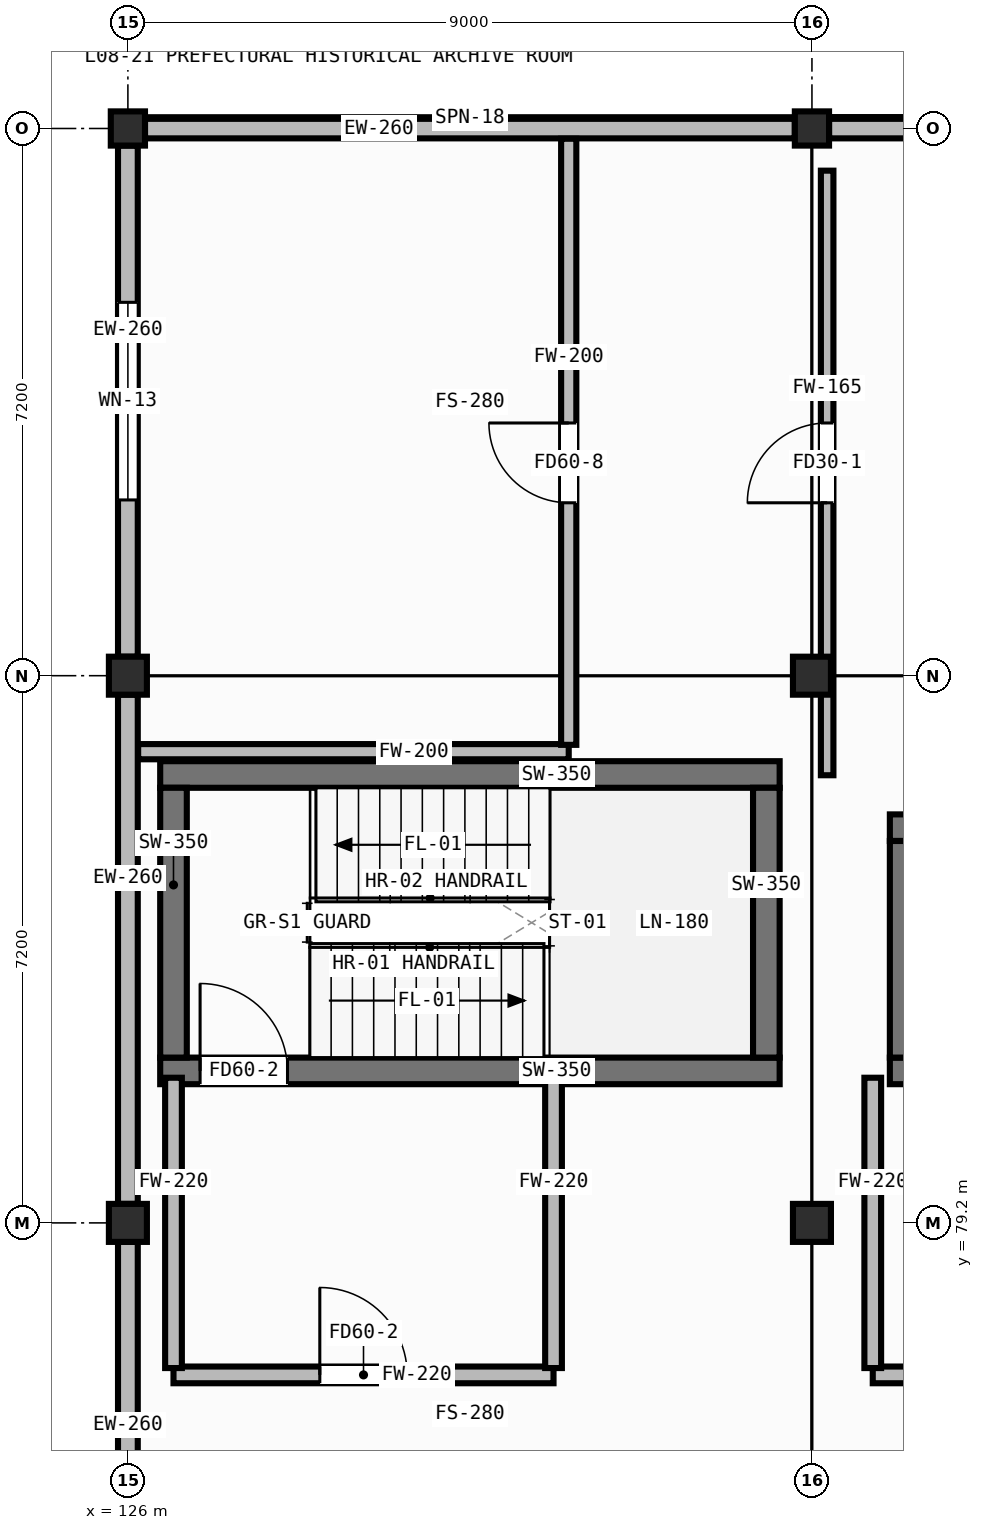
"""IFC4 building model, lengths in metres.
Left out: names, types, materials, properties, quantities, classifications, styles, units other than length and angle.
Written with IfcOpenShell. Run it as: python <this file> out.ifc"""

import sys

from ifc_helpers import new_model, si_unit, direction, frame, frame_2d, origin, origin_2d, place, context, subcontext, project, spatial, rectangle, hollow_rectangle, extrude, element, fill, save


model = new_model("IFC4")
c1 = context("Model", 3, precision=1e-05, world=origin(), true_north=direction((0.0, 1.0)))
c2 = subcontext(c1, "Body", "Model", "MODEL_VIEW")
j1 = project(units=[si_unit("LENGTHUNIT", "METRE"), si_unit("PLANEANGLEUNIT", "RADIAN")], contexts=[c1])
p1 = place(None, origin())
s1 = spatial("IfcSite", under=j1, at=p1, CompositionType="ELEMENT")
p2 = place(p1, origin())
s2 = spatial("IfcBuilding", under=s1, at=p2, CompositionType="ELEMENT")
p3 = place(p2, frame((0.0, 0.0, 27.8)))
s3 = spatial("IfcBuildingStorey", under=s2, at=p3, CompositionType="ELEMENT", Elevation=27.8)
for number, where, z_axis, x_axis in (
    (1, (126.0, 79.2, 0.0), (0.0, 0.0, 1.0), (1.0, 0.0, 0.0)),
    (2, (126.0, 86.4, 0.0), (0.0, 0.0, 1.0), (1.0, 0.0, 0.0)),
):
    element("IfcColumn", number, at=place(p3, frame(where, z_axis=z_axis, x_axis=x_axis)), inside=s3, PredefinedType="COLUMN", context=c2, shape_type="SweptSolid", body=[
        extrude(hollow_rectangle(XDim=0.5, YDim=0.5, WallThickness=0.022, at=origin_2d()), origin(), (0.0, 0.0, 1.0), 3.6),
    ])
p4 = place(p3, frame((126.0, 93.6, 0.0), z_axis=(0.0, 0.0, 1.0), x_axis=(1.0, 0.0, 0.0)))
e3 = element("IfcColumn", 3, at=p4, inside=s3, PredefinedType="COLUMN", context=c2, shape_type="SweptSolid", body=[
    extrude(hollow_rectangle(XDim=0.45, YDim=0.45, WallThickness=0.019, at=origin_2d()), origin(), (0.0, 0.0, 1.0), 3.6),
])
for number, where, z_axis, x_axis in (
    (4, (135.0, 79.2, 0.0), (0.0, 0.0, 1.0), (1.0, 0.0, 0.0)),
    (5, (135.0, 86.4, 0.0), (0.0, 0.0, 1.0), (1.0, 0.0, 0.0)),
):
    element("IfcColumn", number, at=place(p3, frame(where, z_axis=z_axis, x_axis=x_axis)), inside=s3, PredefinedType="COLUMN", context=c2, shape_type="SweptSolid", body=[
        extrude(hollow_rectangle(XDim=0.5, YDim=0.5, WallThickness=0.022, at=origin_2d()), origin(), (0.0, 0.0, 1.0), 3.6),
    ])
p5 = place(p3, frame((135.0, 93.6, 0.0), z_axis=(0.0, 0.0, 1.0), x_axis=(1.0, 0.0, 0.0)))
e6 = element("IfcColumn", 6, at=p5, inside=s3, PredefinedType="COLUMN", context=c2, shape_type="SweptSolid", body=[
    extrude(hollow_rectangle(XDim=0.45, YDim=0.45, WallThickness=0.019, at=origin_2d()), origin(), (0.0, 0.0, 1.0), 3.6),
])
p6 = place(p3, frame((134.775, 93.6, 0.0), z_axis=(0.0, 0.0, 1.0), x_axis=(-1.0, 0.0, 0.0)))
e7 = element("IfcWall", 7, at=p6, inside=s3, PredefinedType="STANDARD", context=c2, shape_type="SweptSolid", body=[
    extrude(rectangle(XDim=8.55, YDim=0.26, at=frame_2d((4.275, 0.0))), origin(), (0.0, 0.0, 1.0), 2.915),
])
p7 = place(p3, frame((143.775, 93.6, 0.0), z_axis=(0.0, 0.0, 1.0), x_axis=(-1.0, 0.0, 0.0)))
e8 = element("IfcWall", 8, at=p7, inside=s3, PredefinedType="STANDARD", context=c2, shape_type="SweptSolid", body=[
    extrude(rectangle(XDim=8.55, YDim=0.26, at=frame_2d((4.275, 0.0))), origin(), (0.0, 0.0, 1.0), 2.915),
])
p8 = place(p7, frame((2.975, 0.0, 0.85)))
e9 = element("IfcOpeningElement", 9, at=p8, cuts=e8, PredefinedType="OPENING", context=c2, shape_type="SweptSolid", body=[
    extrude(rectangle(XDim=2.6, YDim=1.6, at=frame_2d((1.3, 0.8))), frame((0.0, 0.142, 0.0), z_axis=(0.0, -1.0, 0.0), x_axis=(1.0, 0.0, 0.0)), (0.0, 0.0, 1.0), 0.284),
])
for number, where, z_axis, x_axis in (
    (10, (126.0, 72.25, 0.0), (0.0, 0.0, 1.0), (0.0, 1.0, 0.0)),
    (11, (126.0, 79.45, 0.0), (0.0, 0.0, 1.0), (0.0, 1.0, 0.0)),
):
    element("IfcWall", number, at=place(p3, frame(where, z_axis=z_axis, x_axis=x_axis)), inside=s3, PredefinedType="STANDARD", context=c2, shape_type="SweptSolid", body=[
        extrude(rectangle(XDim=6.7, YDim=0.26, at=frame_2d((3.35, 0.0))), origin(), (0.0, 0.0, 1.0), 2.915),
    ])
p9 = place(p3, frame((126.0, 86.65, 0.0), z_axis=(0.0, 0.0, 1.0), x_axis=(0.0, 1.0, 0.0)))
e12 = element("IfcWall", 12, at=p9, inside=s3, PredefinedType="STANDARD", context=c2, shape_type="SweptSolid", body=[
    extrude(rectangle(XDim=6.725, YDim=0.26, at=frame_2d((3.363, 0.0))), origin(), (0.0, 0.0, 1.0), 2.915),
])
p10 = place(p9, frame((2.062, 0.0, 0.85)))
e13 = element("IfcOpeningElement", 13, at=p10, cuts=e12, PredefinedType="OPENING", context=c2, shape_type="SweptSolid", body=[
    extrude(rectangle(XDim=2.6, YDim=1.6, at=frame_2d((1.3, 0.8))), frame((0.0, 0.142, 0.0), z_axis=(0.0, -1.0, 0.0), x_axis=(1.0, 0.0, 0.0)), (0.0, 0.0, 1.0), 0.284),
])
p11 = place(p3, frame((126.425, 81.2, 0.0), z_axis=(0.0, 0.0, 1.0), x_axis=(1.0, 0.0, 0.0)))
e14 = element("IfcWall", 14, at=p11, inside=s3, PredefinedType="SHEAR", context=c2, shape_type="SweptSolid", body=[
    extrude(rectangle(XDim=8.15, YDim=0.35, at=frame_2d((4.075, 0.0))), origin(), (0.0, 0.0, 1.0), 3.315),
])
p12 = place(p11, frame((0.525, 0.0, 0.0)))
e15 = element("IfcOpeningElement", 15, at=p12, cuts=e14, PredefinedType="OPENING", context=c2, shape_type="SweptSolid", body=[
    extrude(rectangle(XDim=1.15, YDim=2.1, at=frame_2d((0.575, 1.05))), frame((0.0, 0.187, 0.0), z_axis=(0.0, -1.0, 0.0), x_axis=(1.0, 0.0, 0.0)), (0.0, 0.0, 1.0), 0.374),
])
p13 = place(p3, frame((126.425, 85.1, 0.0), z_axis=(0.0, 0.0, 1.0), x_axis=(1.0, 0.0, 0.0)))
e16 = element("IfcWall", 16, at=p13, inside=s3, PredefinedType="SHEAR", context=c2, shape_type="SweptSolid", body=[
    extrude(rectangle(XDim=8.15, YDim=0.35, at=frame_2d((4.075, 0.0))), origin(), (0.0, 0.0, 1.0), 3.315),
])
for number, where, z_axis, x_axis in (
    (17, (126.6, 81.375, 0.0), (0.0, 0.0, 1.0), (0.0, 1.0, 0.0)),
    (18, (134.4, 81.375, 0.0), (0.0, 0.0, 1.0), (0.0, 1.0, 0.0)),
):
    element("IfcWall", number, at=place(p3, frame(where, z_axis=z_axis, x_axis=x_axis)), inside=s3, PredefinedType="SHEAR", context=c2, shape_type="SweptSolid", body=[
        extrude(rectangle(XDim=3.55, YDim=0.35, at=frame_2d((1.775, 0.0))), origin(), (0.0, 0.0, 1.0), 3.315),
    ])
p14 = place(p3, frame((136.025, 81.2, 0.0), z_axis=(0.0, 0.0, 1.0), x_axis=(1.0, 0.0, 0.0)))
e19 = element("IfcWall", 19, at=p14, inside=s3, PredefinedType="SHEAR", context=c2, shape_type="SweptSolid", body=[
    extrude(rectangle(XDim=2.75, YDim=0.35, at=frame_2d((1.375, 0.0))), origin(), (0.0, 0.0, 1.0), 3.315),
])
p15 = place(p14, frame((0.8, 0.0, 0.0)))
e20 = element("IfcOpeningElement", 20, at=p15, cuts=e19, PredefinedType="OPENING", context=c2, shape_type="SweptSolid", body=[
    extrude(rectangle(XDim=1.15, YDim=2.12, at=frame_2d((0.575, 1.06))), frame((0.0, 0.187, 0.0), z_axis=(0.0, -1.0, 0.0), x_axis=(1.0, 0.0, 0.0)), (0.0, 0.0, 1.0), 0.374),
])
p16 = place(p3, frame((136.025, 84.4, 0.0), z_axis=(0.0, 0.0, 1.0), x_axis=(1.0, 0.0, 0.0)))
e21 = element("IfcWall", 21, at=p16, inside=s3, PredefinedType="SHEAR", context=c2, shape_type="SweptSolid", body=[
    extrude(rectangle(XDim=2.75, YDim=0.35, at=frame_2d((1.375, 0.0))), origin(), (0.0, 0.0, 1.0), 3.315),
])
p17 = place(p3, frame((136.2, 81.375, 0.0), z_axis=(0.0, 0.0, 1.0), x_axis=(0.0, 1.0, 0.0)))
e22 = element("IfcWall", 22, at=p17, inside=s3, PredefinedType="SHEAR", context=c2, shape_type="SweptSolid", body=[
    extrude(rectangle(XDim=2.85, YDim=0.35, at=frame_2d((1.425, 0.0))), origin(), (0.0, 0.0, 1.0), 3.315),
])
p18 = place(p3, frame((126.6, 77.2, 0.0), z_axis=(0.0, 0.0, 1.0), x_axis=(1.0, 0.0, 0.0)))
e23 = element("IfcWall", 23, at=p18, inside=s3, PredefinedType="PARTITIONING", context=c2, shape_type="SweptSolid", body=[
    extrude(rectangle(XDim=5.0, YDim=0.22, at=frame_2d((2.5, 0.0))), origin(), (0.0, 0.0, 1.0), 3.315),
])
p19 = place(p18, frame((1.925, 0.0, 0.0)))
e24 = element("IfcOpeningElement", 24, at=p19, cuts=e23, PredefinedType="OPENING", context=c2, shape_type="SweptSolid", body=[
    extrude(rectangle(XDim=1.15, YDim=2.1, at=frame_2d((0.575, 1.05))), frame((0.0, 0.122, 0.0), z_axis=(0.0, -1.0, 0.0), x_axis=(1.0, 0.0, 0.0)), (0.0, 0.0, 1.0), 0.244),
])
for number, where, z_axis, x_axis in (
    (25, (126.6, 77.29, 0.0), (0.0, 0.0, 1.0), (0.0, 1.0, 0.0)),
    (26, (131.6, 77.29, 0.0), (0.0, 0.0, 1.0), (0.0, 1.0, 0.0)),
):
    element("IfcWall", number, at=place(p3, frame(where, z_axis=z_axis, x_axis=x_axis)), inside=s3, PredefinedType="PARTITIONING", context=c2, shape_type="SweptSolid", body=[
        extrude(rectangle(XDim=3.82, YDim=0.22, at=frame_2d((1.91, 0.0))), origin(), (0.0, 0.0, 1.0), 3.315),
    ])
p20 = place(p3, frame((135.8, 77.2, 0.0), z_axis=(0.0, 0.0, 1.0), x_axis=(1.0, 0.0, 0.0)))
e27 = element("IfcWall", 27, at=p20, inside=s3, PredefinedType="PARTITIONING", context=c2, shape_type="SweptSolid", body=[
    extrude(rectangle(XDim=7.8, YDim=0.22, at=frame_2d((3.9, 0.0))), origin(), (0.0, 0.0, 1.0), 3.315),
])
p21 = place(p20, frame((3.175, 0.0, 0.0)))
e28 = element("IfcOpeningElement", 28, at=p21, cuts=e27, PredefinedType="OPENING", context=c2, shape_type="SweptSolid", body=[
    extrude(rectangle(XDim=1.05, YDim=2.02, at=frame_2d((0.525, 1.01))), frame((0.0, 0.122, 0.0), z_axis=(0.0, -1.0, 0.0), x_axis=(1.0, 0.0, 0.0)), (0.0, 0.0, 1.0), 0.244),
])
p22 = place(p3, frame((135.8, 77.29, 0.0), z_axis=(0.0, 0.0, 1.0), x_axis=(0.0, 1.0, 0.0)))
e29 = element("IfcWall", 29, at=p22, inside=s3, PredefinedType="PARTITIONING", context=c2, shape_type="SweptSolid", body=[
    extrude(rectangle(XDim=3.82, YDim=0.22, at=frame_2d((1.91, 0.0))), origin(), (0.0, 0.0, 1.0), 3.315),
])
p23 = place(p3, frame((126.135, 85.4, 0.0), z_axis=(0.0, 0.0, 1.0), x_axis=(1.0, 0.0, 0.0)))
e30 = element("IfcWall", 30, at=p23, inside=s3, PredefinedType="PARTITIONING", context=c2, shape_type="SweptSolid", body=[
    extrude(rectangle(XDim=5.665, YDim=0.2, at=frame_2d((2.833, 0.0))), origin(), (0.0, 0.0, 1.0), 3.315),
])
p24 = place(p3, frame((131.8, 85.49, 0.0), z_axis=(0.0, 0.0, 1.0), x_axis=(0.0, 1.0, 0.0)))
e31 = element("IfcWall", 31, at=p24, inside=s3, PredefinedType="PARTITIONING", context=c2, shape_type="SweptSolid", body=[
    extrude(rectangle(XDim=7.975, YDim=0.2, at=frame_2d((3.988, 0.0))), origin(), (0.0, 0.0, 1.0), 3.315),
])
p25 = place(p24, frame((3.185, 0.0, 0.0)))
e32 = element("IfcOpeningElement", 32, at=p25, cuts=e31, PredefinedType="OPENING", context=c2, shape_type="SweptSolid", body=[
    extrude(rectangle(XDim=1.05, YDim=2.02, at=frame_2d((0.525, 1.01))), frame((0.0, 0.112, 0.0), z_axis=(0.0, -1.0, 0.0), x_axis=(1.0, 0.0, 0.0)), (0.0, 0.0, 1.0), 0.224),
])
p26 = place(p3, frame((135.2, 85.09, 0.0), z_axis=(0.0, 0.0, 1.0), x_axis=(0.0, 1.0, 0.0)))
e33 = element("IfcWall", 33, at=p26, inside=s3, PredefinedType="PARTITIONING", context=c2, shape_type="SweptSolid", body=[
    extrude(rectangle(XDim=7.955, YDim=0.165, at=frame_2d((3.978, 0.0))), origin(), (0.0, 0.0, 1.0), 2.595),
])
p27 = place(p26, frame((3.585, 0.0, 0.0)))
e34 = element("IfcOpeningElement", 34, at=p27, cuts=e33, PredefinedType="OPENING", context=c2, shape_type="SweptSolid", body=[
    extrude(rectangle(XDim=1.05, YDim=2.1, at=frame_2d((0.525, 1.05))), frame((0.0, 0.094, 0.0), z_axis=(0.0, -1.0, 0.0), x_axis=(1.0, 0.0, 0.0)), (0.0, 0.0, 1.0), 0.189),
])
p28 = place(p10, origin())
e35 = element("IfcWindow", 35, at=p28, inside=s3, PartitioningType="DOUBLE_PANEL_VERTICAL", PredefinedType="WINDOW", context=c2, shape_type="SweptSolid", body=[
    extrude(rectangle(XDim=2.6, YDim=1.6, at=frame_2d((1.3, 0.8))), frame((0.0, 0.03, 0.0), z_axis=(0.0, -1.0, 0.0), x_axis=(1.0, 0.0, 0.0)), (0.0, 0.0, 1.0), 0.06),
])
fill(e13, e35)
p29 = place(p12, origin())
e36 = element("IfcDoor", 36, at=p29, inside=s3, OperationType="SINGLE_SWING_LEFT", PredefinedType="DOOR", context=c2, shape_type="SweptSolid", body=[
    extrude(rectangle(XDim=1.15, YDim=2.1, at=frame_2d((0.575, 1.05))), frame((0.0, 0.025, 0.0), z_axis=(0.0, -1.0, 0.0), x_axis=(1.0, 0.0, 0.0)), (0.0, 0.0, 1.0), 0.05),
])
fill(e15, e36)
p30 = place(p19, origin())
e37 = element("IfcDoor", 37, at=p30, inside=s3, OperationType="SINGLE_SWING_LEFT", PredefinedType="DOOR", context=c2, shape_type="SweptSolid", body=[
    extrude(rectangle(XDim=1.15, YDim=2.1, at=frame_2d((0.575, 1.05))), frame((0.0, 0.025, 0.0), z_axis=(0.0, -1.0, 0.0), x_axis=(1.0, 0.0, 0.0)), (0.0, 0.0, 1.0), 0.05),
])
fill(e24, e37)
p31 = place(p25, origin())
e38 = element("IfcDoor", 38, at=p31, inside=s3, OperationType="SINGLE_SWING_RIGHT", PredefinedType="DOOR", context=c2, shape_type="SweptSolid", body=[
    extrude(rectangle(XDim=1.05, YDim=2.02, at=frame_2d((0.525, 1.01))), frame((0.0, 0.025, 0.0), z_axis=(0.0, -1.0, 0.0), x_axis=(1.0, 0.0, 0.0)), (0.0, 0.0, 1.0), 0.05),
])
fill(e32, e38)
p32 = place(p27, origin())
e39 = element("IfcDoor", 39, at=p32, inside=s3, OperationType="SINGLE_SWING_LEFT", PredefinedType="DOOR", context=c2, shape_type="SweptSolid", body=[
    extrude(rectangle(XDim=1.05, YDim=2.1, at=frame_2d((0.525, 1.05))), frame((0.0, 0.025, 0.0), z_axis=(0.0, -1.0, 0.0), x_axis=(1.0, 0.0, 0.0)), (0.0, 0.0, 1.0), 0.05),
])
fill(e34, e39)
save(model, sys.argv[1])
